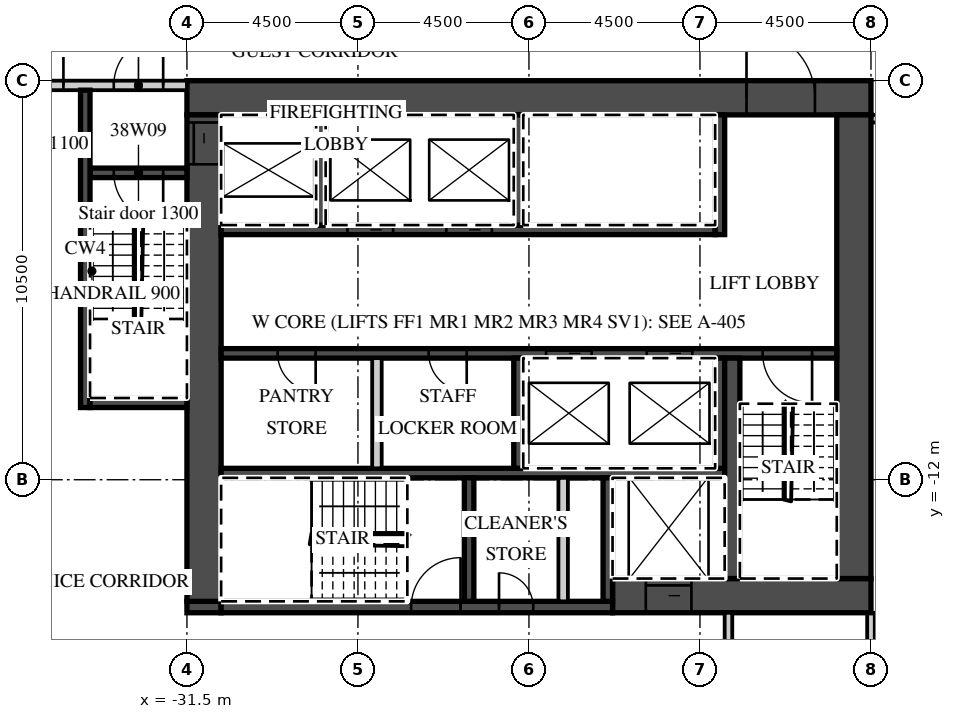
"""IFC4 building model, lengths in metres.
Left out: names, types, materials, properties, quantities, classifications, styles, units other than length and angle.
Written with IfcOpenShell. Run it as: python <this file> out.ifc"""

import sys

from ifc_helpers import new_model, si_unit, direction, frame, frame_2d, origin, place, context, subcontext, project, spatial, rectangle, extrude, element, fill, save


model = new_model("IFC4")
c1 = context("Model", 3, precision=1e-05, world=origin(), true_north=direction((0.0, 1.0)))
c2 = subcontext(c1, "Body", "Model", "MODEL_VIEW")
j1 = project(units=[si_unit("LENGTHUNIT", "METRE"), si_unit("PLANEANGLEUNIT", "RADIAN")], contexts=[c1])
p1 = place(None, origin())
s1 = spatial("IfcSite", under=j1, at=p1, CompositionType="ELEMENT")
p2 = place(p1, origin())
s2 = spatial("IfcBuilding", under=s1, at=p2, CompositionType="ELEMENT")
p3 = place(p2, frame((0.0, 0.0, 166.9)))
s3 = spatial("IfcBuildingStorey", under=s2, at=p3, CompositionType="ELEMENT", Elevation=166.9)
p4 = place(p3, frame((-13.5, -22.3, 0.0), z_axis=(0.0, 0.0, 1.0), x_axis=(0.0, 1.0, 0.0)))
e1 = element("IfcWall", 1, at=p4, inside=s3, PredefinedType="PARTITIONING", context=c2, shape_type="SweptSolid", body=[
    extrude(rectangle(XDim=6.8, YDim=0.2, at=frame_2d((3.4, 0.0))), origin(), (0.0, 0.0, 1.0), 3.02),
])
p5 = place(p3, frame((-13.5, -2.5, 0.0), z_axis=(0.0, 0.0, 1.0), x_axis=(1.0, 0.0, 0.0)))
e2 = element("IfcWall", 2, at=p5, inside=s3, PredefinedType="PARTITIONING", context=c2, shape_type="SweptSolid", body=[
    extrude(rectangle(XDim=27.0, YDim=0.2, at=frame_2d((13.5, 0.0))), origin(), (0.0, 0.0, 1.0), 3.02),
])
p6 = place(p5, frame((0.575, 0.0, 0.0)))
e3 = element("IfcOpeningElement", 3, at=p6, cuts=e2, PredefinedType="OPENING", context=c2, shape_type="SweptSolid", body=[
    extrude(rectangle(XDim=1.0, YDim=2.1, at=frame_2d((0.5, 1.05))), frame((0.0, 0.11, 0.0), z_axis=(0.0, -1.0, 0.0), x_axis=(1.0, 0.0, 0.0)), (0.0, 0.0, 1.0), 0.22),
])
p7 = place(p5, frame((9.863, 0.0, 0.0)))
e4 = element("IfcOpeningElement", 4, at=p7, cuts=e2, PredefinedType="OPENING", context=c2, shape_type="SweptSolid", body=[
    extrude(rectangle(XDim=1.2, YDim=2.1, at=frame_2d((0.6, 1.05))), frame((0.0, 0.11, 0.0), z_axis=(0.0, -1.0, 0.0), x_axis=(1.0, 0.0, 0.0)), (0.0, 0.0, 1.0), 0.22),
])
p8 = place(p5, frame((15.938, 0.0, 0.0)))
e5 = element("IfcOpeningElement", 5, at=p8, cuts=e2, PredefinedType="OPENING", context=c2, shape_type="SweptSolid", body=[
    extrude(rectangle(XDim=1.2, YDim=2.1, at=frame_2d((0.6, 1.05))), frame((0.0, 0.11, 0.0), z_axis=(0.0, -1.0, 0.0), x_axis=(1.0, 0.0, 0.0)), (0.0, 0.0, 1.0), 0.22),
])
p9 = place(p5, frame((23.075, 0.0, 0.0)))
e6 = element("IfcOpeningElement", 6, at=p9, cuts=e2, PredefinedType="OPENING", context=c2, shape_type="SweptSolid", body=[
    extrude(rectangle(XDim=1.0, YDim=2.1, at=frame_2d((0.5, 1.05))), frame((0.0, 0.11, 0.0), z_axis=(0.0, -1.0, 0.0), x_axis=(1.0, 0.0, 0.0)), (0.0, 0.0, 1.0), 0.22),
])
p10 = place(p3, frame((-31.5, -1.95, 0.0), z_axis=(0.0, 0.0, 1.0), x_axis=(1.0, 0.0, 0.0)))
e7 = element("IfcWall", 7, at=p10, inside=s3, PredefinedType="SHEAR", context=c2, shape_type="SweptSolid", body=[
    extrude(rectangle(XDim=18.0, YDim=0.9, at=frame_2d((9.0, 0.0))), origin(), (0.0, 0.0, 1.0), 3.02),
])
p11 = place(p10, frame((14.725, 0.0, 0.0)))
e8 = element("IfcOpeningElement", 8, at=p11, cuts=e7, PredefinedType="OPENING", context=c2, shape_type="SweptSolid", body=[
    extrude(rectangle(XDim=1.8, YDim=2.1, at=frame_2d((0.9, 1.05))), frame((0.0, 0.46, 0.0), z_axis=(0.0, -1.0, 0.0), x_axis=(1.0, 0.0, 0.0)), (0.0, 0.0, 1.0), 0.92),
])
p12 = place(p3, frame((-20.3, -15.05, 0.0), z_axis=(0.0, 0.0, 1.0), x_axis=(1.0, 0.0, 0.0)))
e9 = element("IfcWall", 9, at=p12, inside=s3, PredefinedType="SHEAR", context=c2, shape_type="SweptSolid", body=[
    extrude(rectangle(XDim=6.8, YDim=0.9, at=frame_2d((3.4, 0.0))), origin(), (0.0, 0.0, 1.0), 3.02),
])
p13 = place(p12, frame((0.875, 0.0, 0.0)))
e10 = element("IfcOpeningElement", 10, at=p13, cuts=e9, PredefinedType="OPENING", context=c2, shape_type="SweptSolid", body=[
    extrude(rectangle(XDim=1.2, YDim=2.1, at=frame_2d((0.6, 1.05))), frame((0.0, 0.46, 0.0), z_axis=(0.0, -1.0, 0.0), x_axis=(1.0, 0.0, 0.0)), (0.0, 0.0, 1.0), 0.92),
])
p14 = place(p3, frame((-31.5, -15.35, 0.0), z_axis=(0.0, 0.0, 1.0), x_axis=(1.0, 0.0, 0.0)))
e11 = element("IfcWall", 11, at=p14, inside=s3, PredefinedType="SHEAR", context=c2, shape_type="SweptSolid", body=[
    extrude(rectangle(XDim=0.9, YDim=0.3, at=frame_2d((0.45, 0.0))), origin(), (0.0, 0.0, 1.0), 3.02),
])
p15 = place(p3, frame((-30.6, -15.35, 0.0), z_axis=(0.0, 0.0, 1.0), x_axis=(1.0, 0.0, 0.0)))
e12 = element("IfcWall", 12, at=p15, inside=s3, PredefinedType="SHEAR", context=c2, shape_type="SweptSolid", body=[
    extrude(rectangle(XDim=10.3, YDim=0.3, at=frame_2d((5.15, 0.0))), origin(), (0.0, 0.0, 1.0), 3.02),
])
p16 = place(p15, frame((5.0, 0.0, 0.0)))
e13 = element("IfcOpeningElement", 13, at=p16, cuts=e12, PredefinedType="OPENING", context=c2, shape_type="SweptSolid", body=[
    extrude(rectangle(XDim=1.3, YDim=2.1, at=frame_2d((0.65, 1.05))), frame((0.0, 0.16, 0.0), z_axis=(0.0, -1.0, 0.0), x_axis=(1.0, 0.0, 0.0)), (0.0, 0.0, 1.0), 0.32),
])
p17 = place(p15, frame((7.312, 0.0, 0.0)))
e14 = element("IfcOpeningElement", 14, at=p17, cuts=e12, PredefinedType="OPENING", context=c2, shape_type="SweptSolid", body=[
    extrude(rectangle(XDim=0.9, YDim=2.1, at=frame_2d((0.45, 1.05))), frame((0.0, 0.16, 0.0), z_axis=(0.0, -1.0, 0.0), x_axis=(1.0, 0.0, 0.0)), (0.0, 0.0, 1.0), 0.32),
])
p18 = place(p3, frame((-31.05, -15.2, 0.0), z_axis=(0.0, 0.0, 1.0), x_axis=(0.0, 1.0, 0.0)))
e15 = element("IfcWall", 15, at=p18, inside=s3, PredefinedType="SHEAR", context=c2, shape_type="SweptSolid", body=[
    extrude(rectangle(XDim=12.8, YDim=0.9, at=frame_2d((6.4, 0.0))), origin(), (0.0, 0.0, 1.0), 3.02),
])
p19 = place(p18, frame((11.5, 0.0, 0.0)))
e16 = element("IfcOpeningElement", 16, at=p19, cuts=e15, PredefinedType="OPENING", context=c2, shape_type="SweptSolid", body=[
    extrude(rectangle(XDim=1.1, YDim=2.1, at=frame_2d((0.55, 1.05))), frame((0.0, 0.46, 0.0), z_axis=(0.0, -1.0, 0.0), x_axis=(1.0, 0.0, 0.0)), (0.0, 0.0, 1.0), 0.92),
])
p20 = place(p3, frame((-13.95, -14.6, 0.0), z_axis=(0.0, 0.0, 1.0), x_axis=(0.0, 1.0, 0.0)))
e17 = element("IfcWall", 17, at=p20, inside=s3, PredefinedType="SHEAR", context=c2, shape_type="SweptSolid", body=[
    extrude(rectangle(XDim=12.2, YDim=0.9, at=frame_2d((6.1, 0.0))), origin(), (0.0, 0.0, 1.0), 3.02),
])
p21 = place(p3, frame((-30.6, -5.425, 0.0), z_axis=(0.0, 0.0, 1.0), x_axis=(1.0, 0.0, 0.0)))
e18 = element("IfcWall", 18, at=p21, inside=s3, PredefinedType="SHEAR", context=c2, shape_type="SweptSolid", body=[
    extrude(rectangle(XDim=13.0, YDim=0.25, at=frame_2d((6.5, 0.0))), origin(), (0.0, 0.0, 1.0), 3.02),
])
p22 = place(p21, frame((3.325, 0.0, 0.0)))
e19 = element("IfcOpeningElement", 19, at=p22, cuts=e18, PredefinedType="OPENING", context=c2, shape_type="SweptSolid", body=[
    extrude(rectangle(XDim=1.2, YDim=2.1, at=frame_2d((0.6, 1.05))), frame((0.0, 0.135, 0.0), z_axis=(0.0, -1.0, 0.0), x_axis=(1.0, 0.0, 0.0)), (0.0, 0.0, 1.0), 0.27),
])
p23 = place(p21, frame((5.925, 0.0, 0.0)))
e20 = element("IfcOpeningElement", 20, at=p23, cuts=e18, PredefinedType="OPENING", context=c2, shape_type="SweptSolid", body=[
    extrude(rectangle(XDim=1.2, YDim=2.1, at=frame_2d((0.6, 1.05))), frame((0.0, 0.135, 0.0), z_axis=(0.0, -1.0, 0.0), x_axis=(1.0, 0.0, 0.0)), (0.0, 0.0, 1.0), 0.27),
])
p24 = place(p3, frame((-17.475, -5.55, 0.0), z_axis=(0.0, 0.0, 1.0), x_axis=(0.0, 1.0, 0.0)))
e21 = element("IfcWall", 21, at=p24, inside=s3, PredefinedType="SHEAR", context=c2, shape_type="SweptSolid", body=[
    extrude(rectangle(XDim=3.15, YDim=0.25, at=frame_2d((1.575, 0.0))), origin(), (0.0, 0.0, 1.0), 3.02),
])
for number, where, z_axis, x_axis in (
    (22, (-27.975, -5.3, 0.0), (0.0, 0.0, 1.0), (0.0, 1.0, 0.0)),
    (23, (-22.775, -5.3, 0.0), (0.0, 0.0, 1.0), (0.0, 1.0, 0.0)),
):
    element("IfcWall", number, at=place(p3, frame(where, z_axis=z_axis, x_axis=x_axis)), inside=s3, PredefinedType="SHEAR", context=c2, shape_type="SweptSolid", body=[
        extrude(rectangle(XDim=2.9, YDim=0.25, at=frame_2d((1.45, 0.0))), origin(), (0.0, 0.0, 1.0), 3.02),
    ])
p25 = place(p3, frame((-30.6, -8.675, 0.0), z_axis=(0.0, 0.0, 1.0), x_axis=(1.0, 0.0, 0.0)))
e24 = element("IfcWall", 24, at=p25, inside=s3, PredefinedType="SHEAR", context=c2, shape_type="SweptSolid", body=[
    extrude(rectangle(XDim=16.2, YDim=0.25, at=frame_2d((8.1, 0.0))), origin(), (0.0, 0.0, 1.0), 3.02),
])
p26 = place(p25, frame((8.55, 0.0, 0.0)))
e25 = element("IfcOpeningElement", 25, at=p26, cuts=e24, PredefinedType="OPENING", context=c2, shape_type="SweptSolid", body=[
    extrude(rectangle(XDim=1.2, YDim=2.1, at=frame_2d((0.6, 1.05))), frame((0.0, 0.135, 0.0), z_axis=(0.0, -1.0, 0.0), x_axis=(1.0, 0.0, 0.0)), (0.0, 0.0, 1.0), 0.27),
])
p27 = place(p25, frame((11.2, 0.0, 0.0)))
e26 = element("IfcOpeningElement", 26, at=p27, cuts=e24, PredefinedType="OPENING", context=c2, shape_type="SweptSolid", body=[
    extrude(rectangle(XDim=1.2, YDim=2.1, at=frame_2d((0.6, 1.05))), frame((0.0, 0.135, 0.0), z_axis=(0.0, -1.0, 0.0), x_axis=(1.0, 0.0, 0.0)), (0.0, 0.0, 1.0), 0.27),
])
p28 = place(p25, frame((14.25, 0.0, 0.0)))
e27 = element("IfcOpeningElement", 27, at=p28, cuts=e24, PredefinedType="OPENING", context=c2, shape_type="SweptSolid", body=[
    extrude(rectangle(XDim=1.3, YDim=2.1, at=frame_2d((0.65, 1.05))), frame((0.0, 0.135, 0.0), z_axis=(0.0, -1.0, 0.0), x_axis=(1.0, 0.0, 0.0)), (0.0, 0.0, 1.0), 0.27),
])
p29 = place(p25, frame((1.488, 0.0, 0.0)))
e28 = element("IfcOpeningElement", 28, at=p29, cuts=e24, PredefinedType="OPENING", context=c2, shape_type="SweptSolid", body=[
    extrude(rectangle(XDim=1.0, YDim=2.1, at=frame_2d((0.5, 1.05))), frame((0.0, 0.135, 0.0), z_axis=(0.0, -1.0, 0.0), x_axis=(1.0, 0.0, 0.0)), (0.0, 0.0, 1.0), 0.27),
])
p30 = place(p25, frame((5.462, 0.0, 0.0)))
e29 = element("IfcOpeningElement", 29, at=p30, cuts=e24, PredefinedType="OPENING", context=c2, shape_type="SweptSolid", body=[
    extrude(rectangle(XDim=1.0, YDim=2.1, at=frame_2d((0.5, 1.05))), frame((0.0, 0.135, 0.0), z_axis=(0.0, -1.0, 0.0), x_axis=(1.0, 0.0, 0.0)), (0.0, 0.0, 1.0), 0.27),
])
p31 = place(p3, frame((-30.6, -11.825, 0.0), z_axis=(0.0, 0.0, 1.0), x_axis=(1.0, 0.0, 0.0)))
e30 = element("IfcWall", 30, at=p31, inside=s3, PredefinedType="SHEAR", context=c2, shape_type="SweptSolid", body=[
    extrude(rectangle(XDim=13.25, YDim=0.25, at=frame_2d((6.625, 0.0))), origin(), (0.0, 0.0, 1.0), 3.02),
])
for number, where, z_axis, x_axis in (
    (31, (-17.475, -11.7, 0.0), (0.0, 0.0, 1.0), (0.0, 1.0, 0.0)),
    (32, (-22.775, -11.7, 0.0), (0.0, 0.0, 1.0), (0.0, 1.0, 0.0)),
):
    element("IfcWall", number, at=place(p3, frame(where, z_axis=z_axis, x_axis=x_axis)), inside=s3, PredefinedType="SHEAR", context=c2, shape_type="SweptSolid", body=[
        extrude(rectangle(XDim=2.9, YDim=0.25, at=frame_2d((1.45, 0.0))), origin(), (0.0, 0.0, 1.0), 3.02),
    ])
p32 = place(p3, frame((-26.5, -11.7, 0.0), z_axis=(0.0, 0.0, 1.0), x_axis=(0.0, 1.0, 0.0)))
e33 = element("IfcWall", 33, at=p32, inside=s3, PredefinedType="PARTITIONING", context=c2, shape_type="SweptSolid", body=[
    extrude(rectangle(XDim=2.9, YDim=0.25, at=frame_2d((1.45, 0.0))), origin(), (0.0, 0.0, 1.0), 3.02),
])
p33 = place(p3, frame((-17.15, -14.6, 0.0), z_axis=(0.0, 0.0, 1.0), x_axis=(0.0, 1.0, 0.0)))
e34 = element("IfcWall", 34, at=p33, inside=s3, PredefinedType="SHEAR", context=c2, shape_type="SweptSolid", body=[
    extrude(rectangle(XDim=5.8, YDim=0.4, at=frame_2d((2.9, 0.0))), origin(), (0.0, 0.0, 1.0), 3.02),
])
for number, where, z_axis, x_axis in (
    (35, (-20.425, -15.2, 0.0), (0.0, 0.0, 1.0), (0.0, 1.0, 0.0)),
    (36, (-24.075, -15.2, 0.0), (0.0, 0.0, 1.0), (0.0, 1.0, 0.0)),
):
    element("IfcWall", number, at=place(p3, frame(where, z_axis=z_axis, x_axis=x_axis)), inside=s3, PredefinedType="SHEAR", context=c2, shape_type="SweptSolid", body=[
        extrude(rectangle(XDim=3.25, YDim=0.25, at=frame_2d((1.625, 0.0))), origin(), (0.0, 0.0, 1.0), 3.02),
    ])
p34 = place(p3, frame((-21.6, -15.2, 0.0), z_axis=(0.0, 0.0, 1.0), x_axis=(0.0, 1.0, 0.0)))
e37 = element("IfcWall", 37, at=p34, inside=s3, PredefinedType="PARTITIONING", context=c2, shape_type="SweptSolid", body=[
    extrude(rectangle(XDim=3.25, YDim=0.25, at=frame_2d((1.625, 0.0))), origin(), (0.0, 0.0, 1.0), 3.02),
])
p35 = place(p3, frame((-42.632, -1.625, 0.0), z_axis=(0.0, 0.0, 1.0), x_axis=(1.0, 0.0, 0.0)))
e38 = element("IfcWall", 38, at=p35, inside=s3, PredefinedType="PARTITIONING", context=c2, shape_type="SweptSolid", body=[
    extrude(rectangle(XDim=11.132, YDim=0.25, at=frame_2d((5.566, 0.0))), origin(), (0.0, 0.0, 1.0), 3.02),
])
p36 = place(p35, frame((9.207, 0.0, 0.0)))
e39 = element("IfcOpeningElement", 39, at=p36, cuts=e38, PredefinedType="OPENING", context=c2, shape_type="SweptSolid", body=[
    extrude(rectangle(XDim=1.3, YDim=2.1, at=frame_2d((0.65, 1.05))), frame((0.0, 0.135, 0.0), z_axis=(0.0, -1.0, 0.0), x_axis=(1.0, 0.0, 0.0)), (0.0, 0.0, 1.0), 0.27),
])
p37 = place(p35, frame((6.781, 0.0, 0.0)))
e40 = element("IfcOpeningElement", 40, at=p37, cuts=e38, PredefinedType="OPENING", context=c2, shape_type="SweptSolid", body=[
    extrude(rectangle(XDim=1.1, YDim=2.1, at=frame_2d((0.55, 1.05))), frame((0.0, 0.135, 0.0), z_axis=(0.0, -1.0, 0.0), x_axis=(1.0, 0.0, 0.0)), (0.0, 0.0, 1.0), 0.27),
])
p38 = place(p3, frame((-34.05, -3.925, 0.0), z_axis=(0.0, 0.0, 1.0), x_axis=(1.0, 0.0, 0.0)))
e41 = element("IfcWall", 41, at=p38, inside=s3, PredefinedType="SHEAR", context=c2, shape_type="SweptSolid", body=[
    extrude(rectangle(XDim=2.55, YDim=0.25, at=frame_2d((1.275, 0.0))), origin(), (0.0, 0.0, 1.0), 3.02),
])
p39 = place(p38, frame((0.625, 0.0, 0.0)))
e42 = element("IfcOpeningElement", 42, at=p39, cuts=e41, PredefinedType="OPENING", context=c2, shape_type="SweptSolid", body=[
    extrude(rectangle(XDim=1.3, YDim=2.1, at=frame_2d((0.65, 1.05))), frame((0.0, 0.135, 0.0), z_axis=(0.0, -1.0, 0.0), x_axis=(1.0, 0.0, 0.0)), (0.0, 0.0, 1.0), 0.27),
])
p40 = place(p3, frame((-34.175, -10.1, 0.0), z_axis=(0.0, 0.0, 1.0), x_axis=(0.0, 1.0, 0.0)))
e43 = element("IfcWall", 43, at=p40, inside=s3, PredefinedType="SHEAR", context=c2, shape_type="SweptSolid", body=[
    extrude(rectangle(XDim=8.35, YDim=0.25, at=frame_2d((4.175, 0.0))), origin(), (0.0, 0.0, 1.0), 3.02),
])
p41 = place(p3, frame((-34.05, -9.975, 0.0), z_axis=(0.0, 0.0, 1.0), x_axis=(1.0, 0.0, 0.0)))
e44 = element("IfcWall", 44, at=p41, inside=s3, PredefinedType="SHEAR", context=c2, shape_type="SweptSolid", body=[
    extrude(rectangle(XDim=2.55, YDim=0.25, at=frame_2d((1.275, 0.0))), origin(), (0.0, 0.0, 1.0), 3.02),
])
p42 = place(p3, frame((-17.25, -17.7, 0.0), z_axis=(0.0, 0.0, 1.0), x_axis=(0.0, 1.0, 0.0)))
e45 = element("IfcWall", 45, at=p42, inside=s3, PredefinedType="PARTITIONING", context=c2, shape_type="SweptSolid", body=[
    extrude(rectangle(XDim=2.2, YDim=0.2, at=frame_2d((1.1, 0.0))), origin(), (0.0, 0.0, 1.0), 3.02),
])
p43 = place(p26, origin())
e46 = element("IfcDoor", 46, at=p43, inside=s3, OperationType="SLIDING_TO_LEFT", PredefinedType="DOOR", context=c2, shape_type="SweptSolid", body=[
    extrude(rectangle(XDim=1.2, YDim=2.1, at=frame_2d((0.6, 1.05))), frame((0.0, 0.025, 0.0), z_axis=(0.0, -1.0, 0.0), x_axis=(1.0, 0.0, 0.0)), (0.0, 0.0, 1.0), 0.05),
])
fill(e25, e46)
p44 = place(p27, origin())
e47 = element("IfcDoor", 47, at=p44, inside=s3, OperationType="SLIDING_TO_RIGHT", PredefinedType="DOOR", context=c2, shape_type="SweptSolid", body=[
    extrude(rectangle(XDim=1.2, YDim=2.1, at=frame_2d((0.6, 1.05))), frame((0.0, 0.025, 0.0), z_axis=(0.0, -1.0, 0.0), x_axis=(1.0, 0.0, 0.0)), (0.0, 0.0, 1.0), 0.05),
])
fill(e26, e47)
p45 = place(p22, origin())
e48 = element("IfcDoor", 48, at=p45, inside=s3, OperationType="SLIDING_TO_RIGHT", PredefinedType="DOOR", context=c2, shape_type="SweptSolid", body=[
    extrude(rectangle(XDim=1.2, YDim=2.1, at=frame_2d((0.6, 1.05))), frame((0.0, 0.025, 0.0), z_axis=(0.0, -1.0, 0.0), x_axis=(1.0, 0.0, 0.0)), (0.0, 0.0, 1.0), 0.05),
])
fill(e19, e48)
p46 = place(p23, origin())
e49 = element("IfcDoor", 49, at=p46, inside=s3, OperationType="SLIDING_TO_RIGHT", PredefinedType="DOOR", context=c2, shape_type="SweptSolid", body=[
    extrude(rectangle(XDim=1.2, YDim=2.1, at=frame_2d((0.6, 1.05))), frame((0.0, 0.025, 0.0), z_axis=(0.0, -1.0, 0.0), x_axis=(1.0, 0.0, 0.0)), (0.0, 0.0, 1.0), 0.05),
])
fill(e20, e49)
p47 = place(p13, origin())
e50 = element("IfcDoor", 50, at=p47, inside=s3, OperationType="SLIDING_TO_LEFT", PredefinedType="DOOR", context=c2, shape_type="SweptSolid", body=[
    extrude(rectangle(XDim=1.2, YDim=2.1, at=frame_2d((0.6, 1.05))), frame((0.0, 0.025, 0.0), z_axis=(0.0, -1.0, 0.0), x_axis=(1.0, 0.0, 0.0)), (0.0, 0.0, 1.0), 0.05),
])
fill(e10, e50)
p48 = place(p19, origin())
e51 = element("IfcDoor", 51, at=p48, inside=s3, OperationType="SLIDING_TO_RIGHT", PredefinedType="DOOR", context=c2, shape_type="SweptSolid", body=[
    extrude(rectangle(XDim=1.1, YDim=2.1, at=frame_2d((0.55, 1.05))), frame((0.0, 0.025, 0.0), z_axis=(0.0, -1.0, 0.0), x_axis=(1.0, 0.0, 0.0)), (0.0, 0.0, 1.0), 0.05),
])
fill(e16, e51)
p49 = place(p11, origin())
e52 = element("IfcDoor", 52, at=p49, inside=s3, OperationType="DOUBLE_DOOR_DOUBLE_SWING", PredefinedType="DOOR", context=c2, shape_type="SweptSolid", body=[
    extrude(rectangle(XDim=1.8, YDim=2.1, at=frame_2d((0.9, 1.05))), frame((0.0, 0.025, 0.0), z_axis=(0.0, -1.0, 0.0), x_axis=(1.0, 0.0, 0.0)), (0.0, 0.0, 1.0), 0.05),
])
fill(e8, e52)
p50 = place(p36, origin())
e53 = element("IfcDoor", 53, at=p50, inside=s3, OperationType="SINGLE_SWING_RIGHT", PredefinedType="DOOR", context=c2, shape_type="SweptSolid", body=[
    extrude(rectangle(XDim=1.3, YDim=2.1, at=frame_2d((0.65, 1.05))), frame((0.0, 0.025, 0.0), z_axis=(0.0, -1.0, 0.0), x_axis=(1.0, 0.0, 0.0)), (0.0, 0.0, 1.0), 0.05),
])
fill(e39, e53)
p51 = place(p39, origin())
e54 = element("IfcDoor", 54, at=p51, inside=s3, OperationType="SINGLE_SWING_RIGHT", PredefinedType="DOOR", context=c2, shape_type="SweptSolid", body=[
    extrude(rectangle(XDim=1.3, YDim=2.1, at=frame_2d((0.65, 1.05))), frame((0.0, 0.025, 0.0), z_axis=(0.0, -1.0, 0.0), x_axis=(1.0, 0.0, 0.0)), (0.0, 0.0, 1.0), 0.05),
])
fill(e42, e54)
p52 = place(p37, origin())
e55 = element("IfcDoor", 55, at=p52, inside=s3, OperationType="SINGLE_SWING_RIGHT", PredefinedType="DOOR", context=c2, shape_type="SweptSolid", body=[
    extrude(rectangle(XDim=1.1, YDim=2.1, at=frame_2d((0.55, 1.05))), frame((0.0, 0.025, 0.0), z_axis=(0.0, -1.0, 0.0), x_axis=(1.0, 0.0, 0.0)), (0.0, 0.0, 1.0), 0.05),
])
fill(e40, e55)
p53 = place(p28, origin())
e56 = element("IfcDoor", 56, at=p53, inside=s3, OperationType="SINGLE_SWING_RIGHT", PredefinedType="DOOR", context=c2, shape_type="SweptSolid", body=[
    extrude(rectangle(XDim=1.3, YDim=2.1, at=frame_2d((0.65, 1.05))), frame((0.0, 0.025, 0.0), z_axis=(0.0, -1.0, 0.0), x_axis=(1.0, 0.0, 0.0)), (0.0, 0.0, 1.0), 0.05),
])
fill(e27, e56)
p54 = place(p16, origin())
e57 = element("IfcDoor", 57, at=p54, inside=s3, OperationType="SINGLE_SWING_RIGHT", PredefinedType="DOOR", context=c2, shape_type="SweptSolid", body=[
    extrude(rectangle(XDim=1.3, YDim=2.1, at=frame_2d((0.65, 1.05))), frame((0.0, 0.025, 0.0), z_axis=(0.0, -1.0, 0.0), x_axis=(1.0, 0.0, 0.0)), (0.0, 0.0, 1.0), 0.05),
])
fill(e13, e57)
p55 = place(p17, origin())
e58 = element("IfcDoor", 58, at=p55, inside=s3, OperationType="SINGLE_SWING_LEFT", PredefinedType="DOOR", context=c2, shape_type="SweptSolid", body=[
    extrude(rectangle(XDim=0.9, YDim=2.1, at=frame_2d((0.45, 1.05))), frame((0.0, 0.025, 0.0), z_axis=(0.0, -1.0, 0.0), x_axis=(1.0, 0.0, 0.0)), (0.0, 0.0, 1.0), 0.05),
])
fill(e14, e58)
p56 = place(p29, origin())
e59 = element("IfcDoor", 59, at=p56, inside=s3, OperationType="SINGLE_SWING_RIGHT", PredefinedType="DOOR", context=c2, shape_type="SweptSolid", body=[
    extrude(rectangle(XDim=1.0, YDim=2.1, at=frame_2d((0.5, 1.05))), frame((0.0, 0.025, 0.0), z_axis=(0.0, -1.0, 0.0), x_axis=(1.0, 0.0, 0.0)), (0.0, 0.0, 1.0), 0.05),
])
fill(e28, e59)
p57 = place(p30, origin())
e60 = element("IfcDoor", 60, at=p57, inside=s3, OperationType="SINGLE_SWING_RIGHT", PredefinedType="DOOR", context=c2, shape_type="SweptSolid", body=[
    extrude(rectangle(XDim=1.0, YDim=2.1, at=frame_2d((0.5, 1.05))), frame((0.0, 0.025, 0.0), z_axis=(0.0, -1.0, 0.0), x_axis=(1.0, 0.0, 0.0)), (0.0, 0.0, 1.0), 0.05),
])
fill(e29, e60)
save(model, sys.argv[1])
